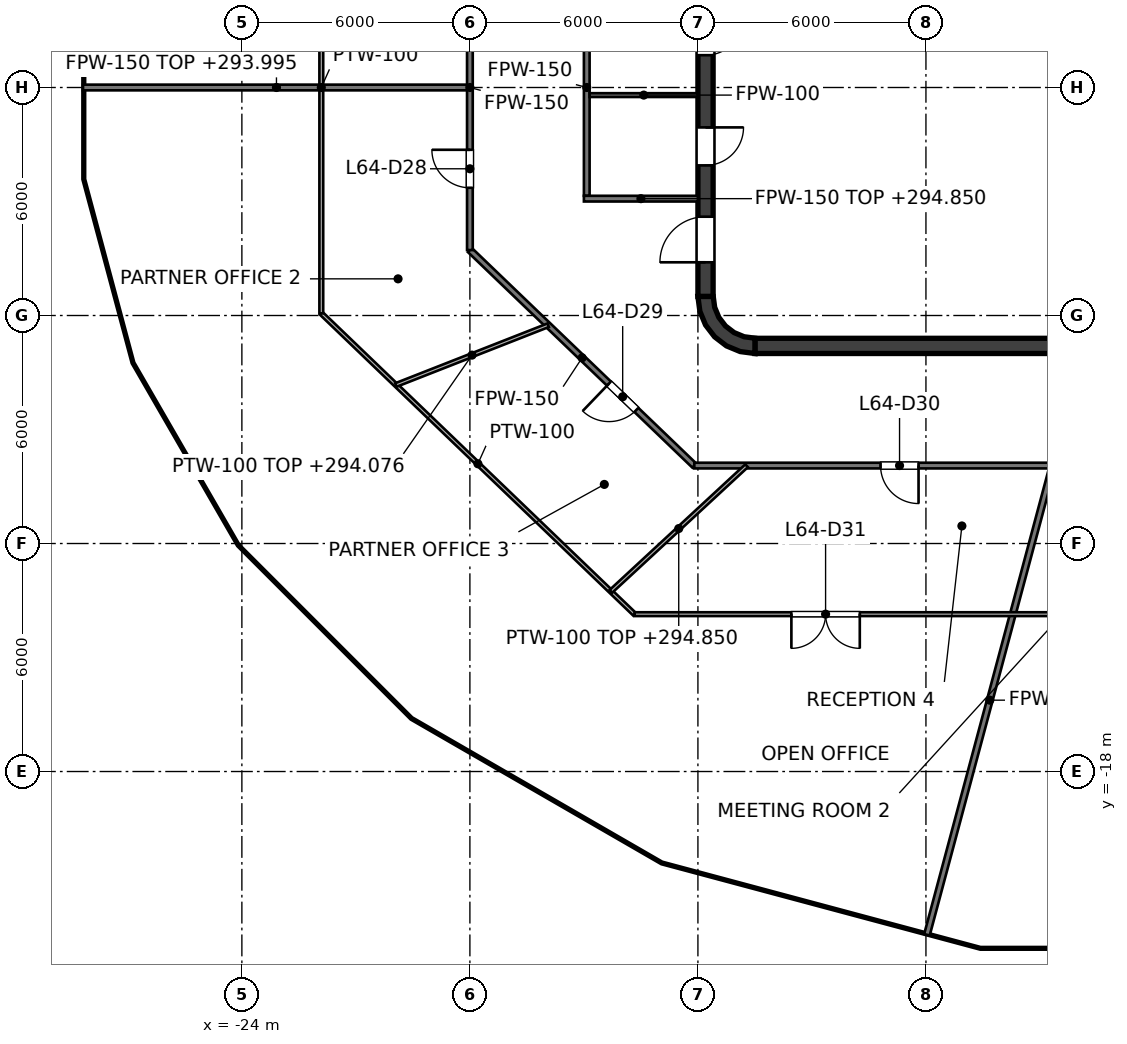
"""IFC4 building model, lengths in metres.
Left out: names, types, materials, properties, quantities, classifications, styles, units other than length and angle.
Written with IfcOpenShell. Run it as: python <this file> out.ifc"""

import sys

from ifc_helpers import new_model, si_unit, direction, frame, frame_2d, origin, place, context, subcontext, project, spatial, polyline, rectangle, outline, extrude, element, fill, save


model = new_model("IFC4")
c1 = context("Model", 3, precision=1e-05, world=origin(), true_north=direction((0.0, 1.0)))
c2 = subcontext(c1, "Body", "Model", "MODEL_VIEW")
j1 = project(units=[si_unit("LENGTHUNIT", "METRE"), si_unit("PLANEANGLEUNIT", "RADIAN")], contexts=[c1])
p1 = place(None, origin())
s1 = spatial("IfcSite", under=j1, at=p1, CompositionType="ELEMENT")
p2 = place(p1, origin())
s2 = spatial("IfcBuilding", under=s1, at=p2, CompositionType="ELEMENT")
p3 = place(p2, frame((0.0, 0.0, 291.0)))
s3 = spatial("IfcBuildingStorey", under=s2, at=p3, CompositionType="ELEMENT", Elevation=291.0)
p4 = place(p3, frame((-10.5, -6.8, 0.0), z_axis=(0.0, 0.0, 1.0), x_axis=(1.0, 0.0, 0.0)))
e1 = element("IfcWall", 1, at=p4, inside=s3, PredefinedType="SHEAR", context=c2, shape_type="SweptSolid", body=[
    extrude(rectangle(XDim=21.0, YDim=0.4, at=frame_2d((10.5, 0.0))), origin(), (0.0, 0.0, 1.0), 4.0),
])
p5 = place(p3, frame((-11.8, -5.5, 0.0), z_axis=(0.0, 0.0, 1.0), x_axis=(0.0, 1.0, 0.0)))
e2 = element("IfcWall", 2, at=p5, inside=s3, PredefinedType="SHEAR", context=c2, shape_type="SweptSolid", body=[
    extrude(rectangle(XDim=11.0, YDim=0.4, at=frame_2d((5.5, 0.0))), origin(), (0.0, 0.0, 1.0), 4.0),
])
p6 = place(p5, frame((3.45, 0.0, 0.0)))
e3 = element("IfcOpeningElement", 3, at=p6, cuts=e2, PredefinedType="OPENING", context=c2, shape_type="SweptSolid", body=[
    extrude(rectangle(XDim=1.0, YDim=2.1, at=frame_2d((0.5, 1.05))), frame((0.0, 0.2, 0.0), z_axis=(0.0, -1.0, 0.0), x_axis=(1.0, 0.0, 0.0)), (0.0, 0.0, 1.0), 0.4),
])
p7 = place(p5, frame((6.35, 0.0, 0.0)))
e4 = element("IfcOpeningElement", 4, at=p7, cuts=e2, PredefinedType="OPENING", context=c2, shape_type="SweptSolid", body=[
    extrude(rectangle(XDim=1.0, YDim=2.1, at=frame_2d((0.5, 1.05))), frame((0.0, 0.2, 0.0), z_axis=(0.0, -1.0, 0.0), x_axis=(1.0, 0.0, 0.0)), (0.0, 0.0, 1.0), 0.4),
])
p8 = place(p5, frame((0.9, 0.0, 0.0)))
e5 = element("IfcOpeningElement", 5, at=p8, cuts=e2, PredefinedType="OPENING", context=c2, shape_type="SweptSolid", body=[
    extrude(rectangle(XDim=1.2, YDim=2.1, at=frame_2d((0.6, 1.05))), frame((0.0, 0.2, 0.0), z_axis=(0.0, -1.0, 0.0), x_axis=(1.0, 0.0, 0.0)), (0.0, 0.0, 1.0), 0.4),
])
p9 = place(p5, frame((8.9, 0.0, 0.0)))
e6 = element("IfcOpeningElement", 6, at=p9, cuts=e2, PredefinedType="OPENING", context=c2, shape_type="SweptSolid", body=[
    extrude(rectangle(XDim=1.2, YDim=2.1, at=frame_2d((0.6, 1.05))), frame((0.0, 0.2, 0.0), z_axis=(0.0, -1.0, 0.0), x_axis=(1.0, 0.0, 0.0)), (0.0, 0.0, 1.0), 0.4),
])
p10 = place(p3, origin())
e7 = element("IfcWall", 7, at=p10, inside=s3, PredefinedType="SHEAR", context=c2, shape_type="SweptSolid", body=[
    extrude(outline(polyline([(-10.5, -7.0), (-10.5, -6.596), (-10.784, -6.559), (-11.048, -6.45), (-11.275, -6.275), (-11.45, -6.048), (-11.559, -5.784), (-11.596, -5.5), (-12.0, -5.5), (-11.949, -5.888), (-11.799, -6.25), (-11.561, -6.561), (-11.25, -6.799), (-10.888, -6.949), (-10.5, -7.0)])), origin(), (0.0, 0.0, 1.0), 4.0),
])
p11 = place(p3, frame((-9.0, -6.6, 0.0), z_axis=(0.0, 0.0, 1.0), x_axis=(0.0, 1.0, 0.0)))
e8 = element("IfcWall", 8, at=p11, inside=s3, PredefinedType="PARTITIONING", context=c2, shape_type="SweptSolid", body=[
    extrude(rectangle(XDim=2.5, YDim=0.25, at=frame_2d((1.25, 0.0))), origin(), (0.0, 0.0, 1.0), 3.85),
])
p12 = place(p11, frame((0.75, 0.0, 0.0)))
e9 = element("IfcOpeningElement", 9, at=p12, cuts=e8, PredefinedType="OPENING", context=c2, shape_type="SweptSolid", body=[
    extrude(rectangle(XDim=1.0, YDim=2.1, at=frame_2d((0.5, 1.05))), frame((0.0, 0.125, 0.0), z_axis=(0.0, -1.0, 0.0), x_axis=(1.0, 0.0, 0.0)), (0.0, 0.0, 1.0), 0.25),
])
p13 = place(p3, frame((-2.9, -6.6, 0.0), z_axis=(0.0, 0.0, 1.0), x_axis=(0.0, 1.0, 0.0)))
e10 = element("IfcWall", 10, at=p13, inside=s3, PredefinedType="PARTITIONING", context=c2, shape_type="SweptSolid", body=[
    extrude(rectangle(XDim=2.5, YDim=0.25, at=frame_2d((1.25, 0.0))), origin(), (0.0, 0.0, 1.0), 3.85),
])
p14 = place(p13, frame((0.8, 0.0, 0.0)))
e11 = element("IfcOpeningElement", 11, at=p14, cuts=e10, PredefinedType="OPENING", context=c2, shape_type="SweptSolid", body=[
    extrude(rectangle(XDim=0.9, YDim=2.1, at=frame_2d((0.45, 1.05))), frame((0.0, 0.125, 0.0), z_axis=(0.0, -1.0, 0.0), x_axis=(1.0, 0.0, 0.0)), (0.0, 0.0, 1.0), 0.25),
])
p15 = place(p3, frame((-9.125, -1.525, 0.0), z_axis=(0.0, 0.0, 1.0), x_axis=(1.0, 0.0, 0.0)))
e12 = element("IfcWall", 12, at=p15, inside=s3, PredefinedType="SOLIDWALL", context=c2, shape_type="SweptSolid", body=[
    extrude(rectangle(XDim=18.25, YDim=0.25, at=frame_2d((9.125, 0.0))), origin(), (0.0, 0.0, 1.0), 3.85),
])
p16 = place(p15, frame((7.15, 0.0, 0.0)))
e13 = element("IfcOpeningElement", 13, at=p16, cuts=e12, PredefinedType="OPENING", context=c2, shape_type="SweptSolid", body=[
    extrude(rectangle(XDim=1.2, YDim=2.1, at=frame_2d((0.6, 1.05))), frame((0.0, 0.125, 0.0), z_axis=(0.0, -1.0, 0.0), x_axis=(1.0, 0.0, 0.0)), (0.0, 0.0, 1.0), 0.25),
])
p17 = place(p15, frame((10.2, 0.0, 0.0)))
e14 = element("IfcOpeningElement", 14, at=p17, cuts=e12, PredefinedType="OPENING", context=c2, shape_type="SweptSolid", body=[
    extrude(rectangle(XDim=1.2, YDim=2.1, at=frame_2d((0.6, 1.05))), frame((0.0, 0.125, 0.0), z_axis=(0.0, -1.0, 0.0), x_axis=(1.0, 0.0, 0.0)), (0.0, 0.0, 1.0), 0.25),
])
p18 = place(p15, frame((16.075, 0.0, 0.0)))
e15 = element("IfcOpeningElement", 15, at=p18, cuts=e12, PredefinedType="OPENING", context=c2, shape_type="SweptSolid", body=[
    extrude(rectangle(XDim=1.0, YDim=2.1, at=frame_2d((0.5, 1.05))), frame((0.0, 0.125, 0.0), z_axis=(0.0, -1.0, 0.0), x_axis=(1.0, 0.0, 0.0)), (0.0, 0.0, 1.0), 0.25),
])
p19 = place(p3, frame((-9.125, -3.975, 0.0), z_axis=(0.0, 0.0, 1.0), x_axis=(1.0, 0.0, 0.0)))
e16 = element("IfcWall", 16, at=p19, inside=s3, PredefinedType="SOLIDWALL", context=c2, shape_type="SweptSolid", body=[
    extrude(rectangle(XDim=12.4, YDim=0.25, at=frame_2d((6.2, 0.0))), origin(), (0.0, 0.0, 1.0), 3.85),
])
p20 = place(p19, frame((1.05, 0.0, 0.0)))
e17 = element("IfcOpeningElement", 17, at=p20, cuts=e16, PredefinedType="OPENING", context=c2, shape_type="SweptSolid", body=[
    extrude(rectangle(XDim=1.2, YDim=2.1, at=frame_2d((0.6, 1.05))), frame((0.0, 0.125, 0.0), z_axis=(0.0, -1.0, 0.0), x_axis=(1.0, 0.0, 0.0)), (0.0, 0.0, 1.0), 0.25),
])
p21 = place(p19, frame((4.1, 0.0, 0.0)))
e18 = element("IfcOpeningElement", 18, at=p21, cuts=e16, PredefinedType="OPENING", context=c2, shape_type="SweptSolid", body=[
    extrude(rectangle(XDim=1.2, YDim=2.1, at=frame_2d((0.6, 1.05))), frame((0.0, 0.125, 0.0), z_axis=(0.0, -1.0, 0.0), x_axis=(1.0, 0.0, 0.0)), (0.0, 0.0, 1.0), 0.25),
])
for number, where, z_axis, x_axis in (
    (19, (-9.0, -3.85, 0.0), (0.0, 0.0, 1.0), (0.0, 1.0, 0.0)),
    (20, (-5.95, -3.85, 0.0), (0.0, 0.0, 1.0), (0.0, 1.0, 0.0)),
    (21, (-2.9, -3.85, 0.0), (0.0, 0.0, 1.0), (0.0, 1.0, 0.0)),
):
    element("IfcWall", number, at=place(p3, frame(where, z_axis=z_axis, x_axis=x_axis)), inside=s3, PredefinedType="SOLIDWALL", context=c2, shape_type="SweptSolid", body=[
        extrude(rectangle(XDim=2.2, YDim=0.25, at=frame_2d((1.1, 0.0))), origin(), (0.0, 0.0, 1.0), 3.85),
    ])
p22 = place(p3, frame((-14.925, -2.85, 0.0), z_axis=(0.0, 0.0, 1.0), x_axis=(0.0, 1.0, 0.0)))
e22 = element("IfcWall", 22, at=p22, inside=s3, PredefinedType="PARTITIONING", context=c2, shape_type="SweptSolid", body=[
    extrude(rectangle(XDim=5.7, YDim=0.15, at=frame_2d((2.85, 0.0))), origin(), (0.0, 0.0, 1.0), 2.927),
])
p23 = place(p3, frame((-15.0, -2.925, 0.0), z_axis=(0.0, 0.0, 1.0), x_axis=(1.0, 0.0, 0.0)))
e23 = element("IfcWall", 23, at=p23, inside=s3, PredefinedType="PARTITIONING", context=c2, shape_type="SweptSolid", body=[
    extrude(rectangle(XDim=3.0, YDim=0.15, at=frame_2d((1.5, 0.0))), origin(), (0.0, 0.0, 1.0), 3.85),
])
p24 = place(p3, frame((-14.85, -0.2, 0.0), z_axis=(0.0, 0.0, 1.0), x_axis=(1.0, 0.0, 0.0)))
e24 = element("IfcWall", 24, at=p24, inside=s3, PredefinedType="PARTITIONING", context=c2, shape_type="SweptSolid", body=[
    extrude(rectangle(XDim=2.85, YDim=0.1, at=frame_2d((1.425, 0.0))), origin(), (0.0, 0.0, 1.0), 3.85),
])
p25 = place(p3, frame((-18.0, -4.278, 0.0), z_axis=(0.0, 0.0, 1.0), x_axis=(0.721290181137, -0.692633001376, 0.0)))
e25 = element("IfcWall", 25, at=p25, inside=s3, PredefinedType="PARTITIONING", context=c2, shape_type="SweptSolid", body=[
    extrude(rectangle(XDim=8.187, YDim=0.15, at=frame_2d((4.094, 0.0))), origin(), (0.0, 0.0, 1.0), 2.927),
])
p26 = place(p25, frame((5.074, 0.0, 0.0)))
e26 = element("IfcOpeningElement", 26, at=p26, cuts=e25, PredefinedType="OPENING", context=c2, shape_type="SweptSolid", body=[
    extrude(rectangle(XDim=1.0, YDim=2.1, at=frame_2d((0.5, 1.05))), frame((0.0, 0.075, 0.0), z_axis=(0.0, -1.0, 0.0), x_axis=(1.0, 0.0, 0.0)), (0.0, 0.0, 1.0), 0.15),
])
p27 = place(p3, frame((-12.095, -9.949, 0.0), z_axis=(0.0, 0.0, 1.0), x_axis=(1.0, 0.0, 0.0)))
e27 = element("IfcWall", 27, at=p27, inside=s3, PredefinedType="PARTITIONING", context=c2, shape_type="SweptSolid", body=[
    extrude(rectangle(XDim=24.19, YDim=0.15, at=frame_2d((12.095, 0.0))), origin(), (0.0, 0.0, 1.0), 2.927),
])
p28 = place(p27, frame((22.617, 0.0, 0.0)))
e28 = element("IfcOpeningElement", 28, at=p28, cuts=e27, PredefinedType="OPENING", context=c2, shape_type="SweptSolid", body=[
    extrude(rectangle(XDim=1.0, YDim=2.1, at=frame_2d((0.5, 1.05))), frame((0.0, 0.075, 0.0), z_axis=(0.0, -1.0, 0.0), x_axis=(1.0, 0.0, 0.0)), (0.0, 0.0, 1.0), 0.15),
])
p29 = place(p27, frame((4.9, 0.0, 0.0)))
e29 = element("IfcOpeningElement", 29, at=p29, cuts=e27, PredefinedType="OPENING", context=c2, shape_type="SweptSolid", body=[
    extrude(rectangle(XDim=1.0, YDim=2.1, at=frame_2d((0.5, 1.05))), frame((0.0, 0.075, 0.0), z_axis=(0.0, -1.0, 0.0), x_axis=(1.0, 0.0, 0.0)), (0.0, 0.0, 1.0), 0.15),
])
p30 = place(p27, frame((11.05, 0.0, 0.0)))
e30 = element("IfcOpeningElement", 30, at=p30, cuts=e27, PredefinedType="OPENING", context=c2, shape_type="SweptSolid", body=[
    extrude(rectangle(XDim=1.0, YDim=2.1, at=frame_2d((0.5, 1.05))), frame((0.0, 0.075, 0.0), z_axis=(0.0, -1.0, 0.0), x_axis=(1.0, 0.0, 0.0)), (0.0, 0.0, 1.0), 0.15),
])
p31 = place(p27, frame((17.307, 0.0, 0.0)))
e31 = element("IfcOpeningElement", 31, at=p31, cuts=e27, PredefinedType="OPENING", context=c2, shape_type="SweptSolid", body=[
    extrude(rectangle(XDim=1.0, YDim=2.1, at=frame_2d((0.5, 1.05))), frame((0.0, 0.075, 0.0), z_axis=(0.0, -1.0, 0.0), x_axis=(1.0, 0.0, 0.0)), (0.0, 0.0, 1.0), 0.15),
])
p32 = place(p3, frame((-28.18, 0.0, 0.0), z_axis=(0.0, 0.0, 1.0), x_axis=(1.0, 0.0, 0.0)))
e32 = element("IfcWall", 32, at=p32, inside=s3, PredefinedType="PARTITIONING", context=c2, shape_type="SweptSolid", body=[
    extrude(rectangle(XDim=10.18, YDim=0.15, at=frame_2d((5.09, 0.0))), origin(), (0.0, 0.0, 1.0), 2.995),
])
p33 = place(p3, frame((-5.974, -22.296, 0.0), z_axis=(0.0, 0.0, 1.0), x_axis=(0.258823917952, 0.9659245206, 0.0)))
e33 = element("IfcWall", 33, at=p33, inside=s3, PredefinedType="PARTITIONING", context=c2, shape_type="SweptSolid", body=[
    extrude(rectangle(XDim=12.782, YDim=0.15, at=frame_2d((6.391, 0.0))), origin(), (0.0, 0.0, 1.0), 3.373),
])
p34 = place(p3, frame((-18.0, -4.278, 0.0), z_axis=(0.0, 0.0, 1.0), x_axis=(0.0, 1.0, 0.0)))
e34 = element("IfcWall", 34, at=p34, inside=s3, PredefinedType="PARTITIONING", context=c2, shape_type="SweptSolid", body=[
    extrude(rectangle(XDim=8.556, YDim=0.15, at=frame_2d((4.278, 0.0))), origin(), (0.0, 0.0, 1.0), 2.927),
])
p35 = place(p34, frame((1.639, 0.0, 0.0)))
e35 = element("IfcOpeningElement", 35, at=p35, cuts=e34, PredefinedType="OPENING", context=c2, shape_type="SweptSolid", body=[
    extrude(rectangle(XDim=1.0, YDim=2.1, at=frame_2d((0.5, 1.05))), frame((0.0, 0.075, 0.0), z_axis=(0.0, -1.0, 0.0), x_axis=(1.0, 0.0, 0.0)), (0.0, 0.0, 1.0), 0.15),
])
p36 = place(p3, frame((-21.91, -5.944, 0.0), z_axis=(0.0, 0.0, 1.0), x_axis=(0.721193028331, -0.692734159608, 0.0)))
e36 = element("IfcWall", 36, at=p36, inside=s3, PredefinedType="PARTITIONING", context=c2, shape_type="SweptSolid", body=[
    extrude(rectangle(XDim=11.427, YDim=0.1, at=frame_2d((5.713, 0.0))), origin(), (0.0, 0.0, 1.0), 2.927),
])
p37 = place(p3, frame((-13.668, -13.859, 0.0), z_axis=(0.0, 0.0, 1.0), x_axis=(1.0, 0.0, 0.0)))
e37 = element("IfcWall", 37, at=p37, inside=s3, PredefinedType="PARTITIONING", context=c2, shape_type="SweptSolid", body=[
    extrude(rectangle(XDim=27.337, YDim=0.1, at=frame_2d((13.668, 0.0))), origin(), (0.0, 0.0, 1.0), 2.927),
])
p38 = place(p37, frame((4.127, 0.0, 0.0)))
e38 = element("IfcOpeningElement", 38, at=p38, cuts=e37, PredefinedType="OPENING", context=c2, shape_type="SweptSolid", body=[
    extrude(rectangle(XDim=1.8, YDim=2.1, at=frame_2d((0.9, 1.05))), frame((0.0, 0.05, 0.0), z_axis=(0.0, -1.0, 0.0), x_axis=(1.0, 0.0, 0.0)), (0.0, 0.0, 1.0), 0.1),
])
p39 = place(p37, frame((20.7, 0.0, 0.0)))
e39 = element("IfcOpeningElement", 39, at=p39, cuts=e37, PredefinedType="OPENING", context=c2, shape_type="SweptSolid", body=[
    extrude(rectangle(XDim=1.8, YDim=2.1, at=frame_2d((0.9, 1.05))), frame((0.0, 0.05, 0.0), z_axis=(0.0, -1.0, 0.0), x_axis=(1.0, 0.0, 0.0)), (0.0, 0.0, 1.0), 0.1),
])
p40 = place(p3, frame((-19.947, -7.829, 0.0), z_axis=(0.0, 0.0, 1.0), x_axis=(0.930847279984, 0.36540845823, 0.0)))
e40 = element("IfcWall", 40, at=p40, inside=s3, PredefinedType="PARTITIONING", context=c2, shape_type="SweptSolid", body=[
    extrude(rectangle(XDim=4.305, YDim=0.1, at=frame_2d((2.152, 0.0))), origin(), (0.0, 0.0, 1.0), 3.076),
])
p41 = place(p3, frame((-14.291, -13.26, 0.0), z_axis=(0.0, 0.0, 1.0), x_axis=(0.733889385895, 0.679268996253, 0.0)))
e41 = element("IfcWall", 41, at=p41, inside=s3, PredefinedType="PARTITIONING", context=c2, shape_type="SweptSolid", body=[
    extrude(rectangle(XDim=4.868, YDim=0.1, at=frame_2d((2.434, 0.0))), origin(), (0.0, 0.0, 1.0), 3.85),
])
p42 = place(p3, frame((-21.91, -5.944, 0.0), z_axis=(0.0, 0.0, 1.0), x_axis=(0.0, 1.0, 0.0)))
e42 = element("IfcWall", 42, at=p42, inside=s3, PredefinedType="PARTITIONING", context=c2, shape_type="SweptSolid", body=[
    extrude(rectangle(XDim=11.888, YDim=0.1, at=frame_2d((5.944, 0.0))), origin(), (0.0, 0.0, 1.0), 2.927),
])
p43 = place(p20, origin())
e43 = element("IfcDoor", 43, at=p43, inside=s3, OperationType="DOUBLE_DOOR_SLIDING", PredefinedType="DOOR", context=c2, shape_type="SweptSolid", body=[
    extrude(rectangle(XDim=1.2, YDim=2.1, at=frame_2d((0.6, 1.05))), frame((0.0, 0.025, 0.0), z_axis=(0.0, -1.0, 0.0), x_axis=(1.0, 0.0, 0.0)), (0.0, 0.0, 1.0), 0.05),
])
fill(e17, e43)
p44 = place(p21, origin())
e44 = element("IfcDoor", 44, at=p44, inside=s3, OperationType="DOUBLE_DOOR_SLIDING", PredefinedType="DOOR", context=c2, shape_type="SweptSolid", body=[
    extrude(rectangle(XDim=1.2, YDim=2.1, at=frame_2d((0.6, 1.05))), frame((0.0, 0.025, 0.0), z_axis=(0.0, -1.0, 0.0), x_axis=(1.0, 0.0, 0.0)), (0.0, 0.0, 1.0), 0.05),
])
fill(e18, e44)
p45 = place(p12, origin())
e45 = element("IfcDoor", 45, at=p45, inside=s3, OperationType="SINGLE_SWING_LEFT", PredefinedType="DOOR", context=c2, shape_type="SweptSolid", body=[
    extrude(rectangle(XDim=1.0, YDim=2.1, at=frame_2d((0.5, 1.05))), frame((0.0, 0.025, 0.0), z_axis=(0.0, -1.0, 0.0), x_axis=(1.0, 0.0, 0.0)), (0.0, 0.0, 1.0), 0.05),
])
fill(e9, e45)
p46 = place(p14, origin())
e46 = element("IfcDoor", 46, at=p46, inside=s3, OperationType="SINGLE_SWING_RIGHT", PredefinedType="DOOR", context=c2, shape_type="SweptSolid", body=[
    extrude(rectangle(XDim=0.9, YDim=2.1, at=frame_2d((0.45, 1.05))), frame((0.0, 0.025, 0.0), z_axis=(0.0, -1.0, 0.0), x_axis=(1.0, 0.0, 0.0)), (0.0, 0.0, 1.0), 0.05),
])
fill(e11, e46)
p47 = place(p6, origin())
e47 = element("IfcDoor", 47, at=p47, inside=s3, OperationType="SINGLE_SWING_RIGHT", PredefinedType="DOOR", context=c2, shape_type="SweptSolid", body=[
    extrude(rectangle(XDim=1.0, YDim=2.1, at=frame_2d((0.5, 1.05))), frame((0.0, 0.025, 0.0), z_axis=(0.0, -1.0, 0.0), x_axis=(1.0, 0.0, 0.0)), (0.0, 0.0, 1.0), 0.05),
])
fill(e3, e47)
p48 = place(p7, origin())
e48 = element("IfcDoor", 48, at=p48, inside=s3, OperationType="SINGLE_SWING_RIGHT", PredefinedType="DOOR", context=c2, shape_type="SweptSolid", body=[
    extrude(rectangle(XDim=1.0, YDim=2.1, at=frame_2d((0.5, 1.05))), frame((0.0, 0.025, 0.0), z_axis=(0.0, -1.0, 0.0), x_axis=(1.0, 0.0, 0.0)), (0.0, 0.0, 1.0), 0.05),
])
fill(e4, e48)
p49 = place(p8, origin())
e49 = element("IfcDoor", 49, at=p49, inside=s3, OperationType="SINGLE_SWING_LEFT", PredefinedType="DOOR", context=c2, shape_type="SweptSolid", body=[
    extrude(rectangle(XDim=1.2, YDim=2.1, at=frame_2d((0.6, 1.05))), frame((0.0, 0.025, 0.0), z_axis=(0.0, -1.0, 0.0), x_axis=(1.0, 0.0, 0.0)), (0.0, 0.0, 1.0), 0.05),
])
fill(e5, e49)
p50 = place(p35, origin())
e50 = element("IfcDoor", 50, at=p50, inside=s3, OperationType="SINGLE_SWING_RIGHT", PredefinedType="DOOR", context=c2, shape_type="SweptSolid", body=[
    extrude(rectangle(XDim=1.0, YDim=2.1, at=frame_2d((0.5, 1.05))), frame((0.0, 0.025, 0.0), z_axis=(0.0, -1.0, 0.0), x_axis=(1.0, 0.0, 0.0)), (0.0, 0.0, 1.0), 0.05),
])
fill(e35, e50)
p51 = place(p26, origin())
e51 = element("IfcDoor", 51, at=p51, inside=s3, OperationType="SINGLE_SWING_LEFT", PredefinedType="DOOR", context=c2, shape_type="SweptSolid", body=[
    extrude(rectangle(XDim=1.0, YDim=2.1, at=frame_2d((0.5, 1.05))), frame((0.0, 0.025, 0.0), z_axis=(0.0, -1.0, 0.0), x_axis=(1.0, 0.0, 0.0)), (0.0, 0.0, 1.0), 0.05),
])
fill(e26, e51)
p52 = place(p29, origin())
e52 = element("IfcDoor", 52, at=p52, inside=s3, OperationType="SINGLE_SWING_RIGHT", PredefinedType="DOOR", context=c2, shape_type="SweptSolid", body=[
    extrude(rectangle(XDim=1.0, YDim=2.1, at=frame_2d((0.5, 1.05))), frame((0.0, 0.025, 0.0), z_axis=(0.0, -1.0, 0.0), x_axis=(1.0, 0.0, 0.0)), (0.0, 0.0, 1.0), 0.05),
])
fill(e29, e52)
p53 = place(p38, origin())
e53 = element("IfcDoor", 53, at=p53, inside=s3, OperationType="DOUBLE_DOOR_SINGLE_SWING", PredefinedType="DOOR", context=c2, shape_type="SweptSolid", body=[
    extrude(rectangle(XDim=1.8, YDim=2.1, at=frame_2d((0.9, 1.05))), frame((0.0, 0.025, 0.0), z_axis=(0.0, -1.0, 0.0), x_axis=(1.0, 0.0, 0.0)), (0.0, 0.0, 1.0), 0.05),
])
fill(e38, e53)
save(model, sys.argv[1])
